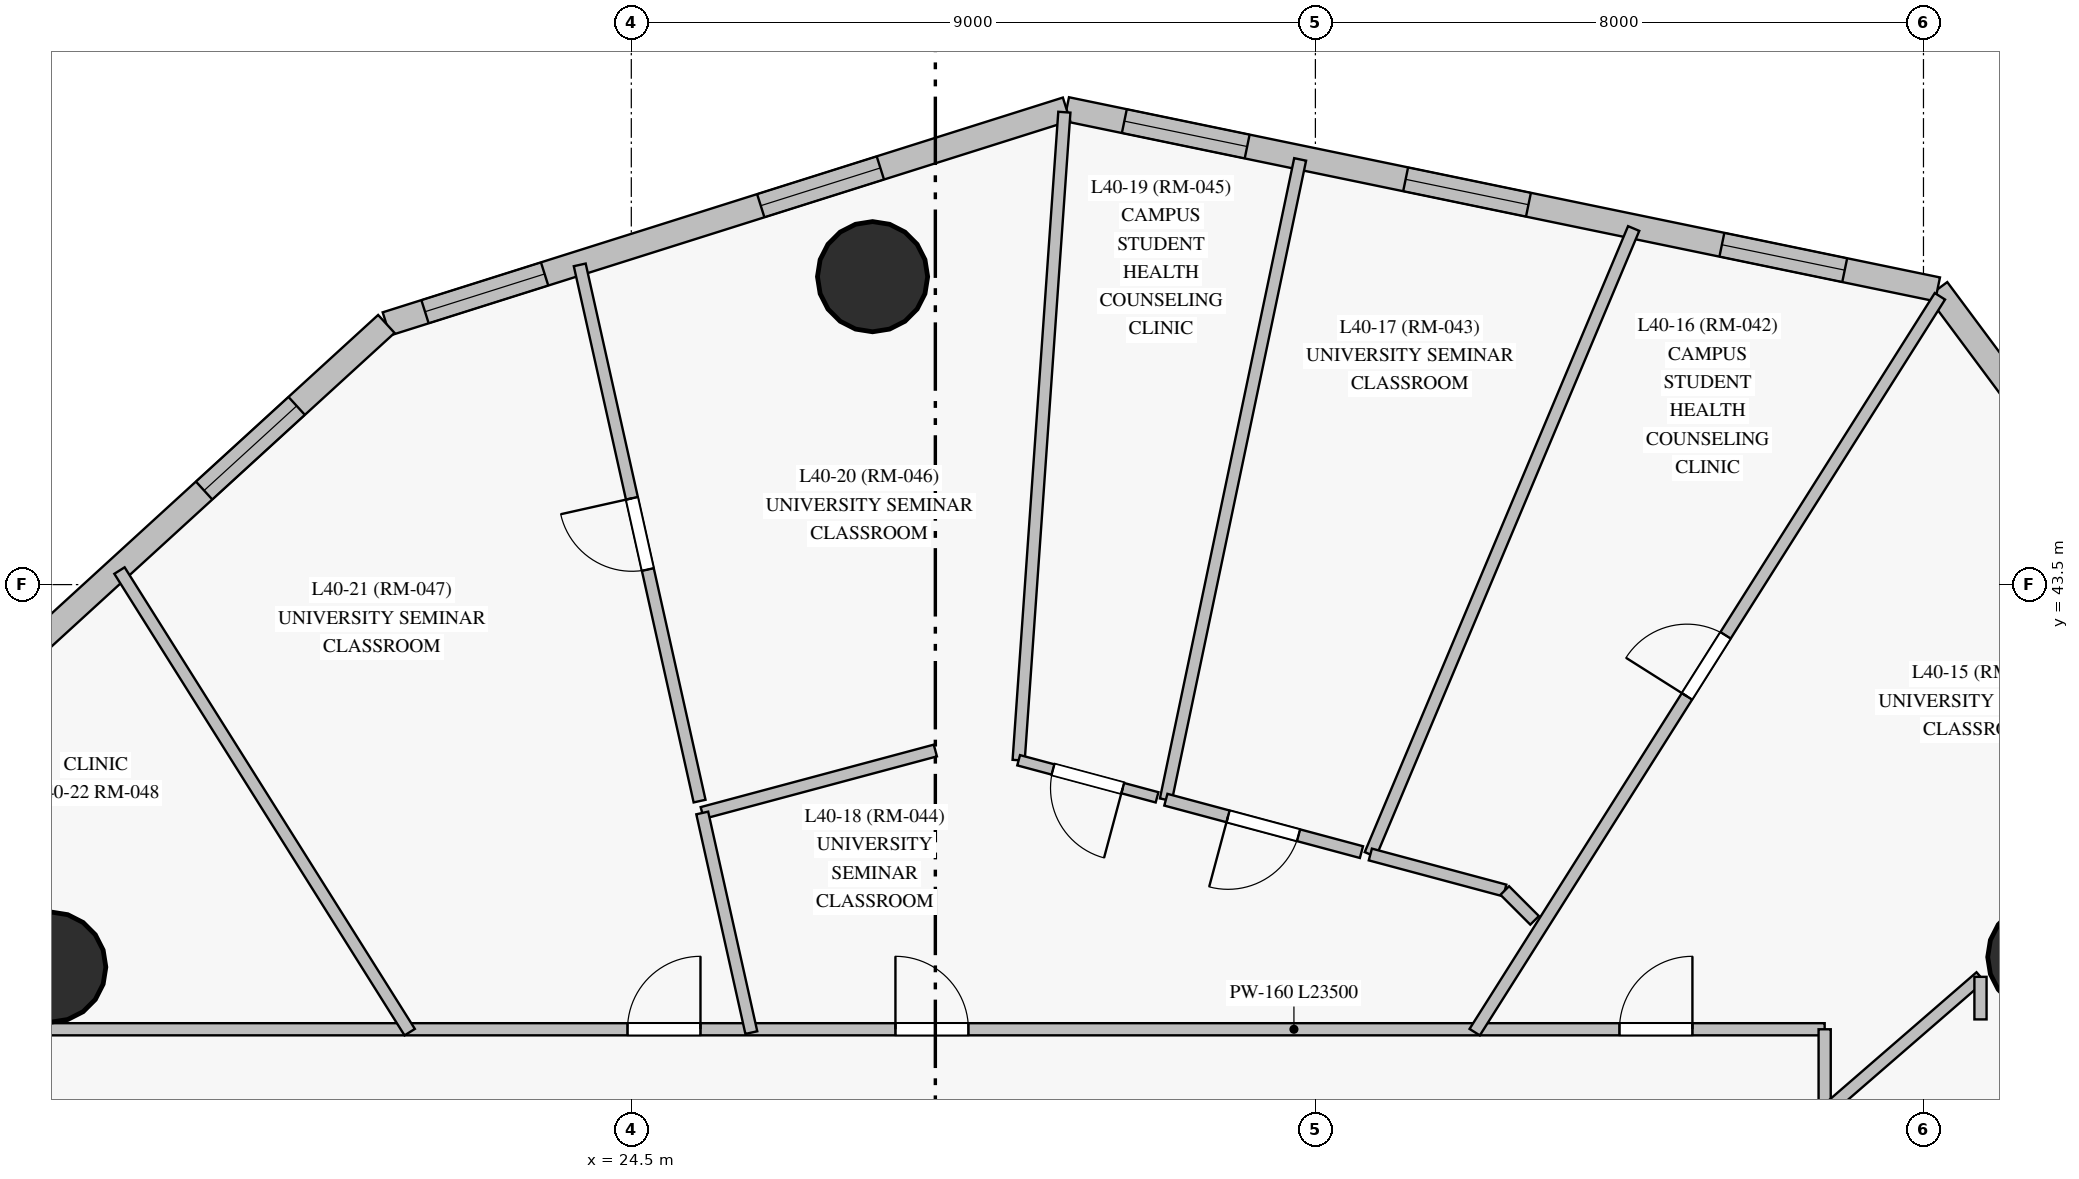
"""IFC4 building model, lengths in metres.
Left out: names, types, materials, properties, quantities, classifications, styles, units other than length and angle.
Written with IfcOpenShell. Run it as: python <this file> out.ifc"""

import sys

from ifc_helpers import new_model, si_unit, direction, frame, frame_2d, origin, origin_with_axes, origin_2d, place, context, subcontext, project, spatial, rectangle, circle, extrude, source, transform, mapped, element, fill, save


model = new_model("IFC4")
c1 = context("Model", 3, precision=1e-05, world=origin(), true_north=direction((0.0, 1.0)))
c2 = subcontext(c1, "Body", "Model", "MODEL_VIEW")
j1 = project(units=[si_unit("LENGTHUNIT", "METRE"), si_unit("PLANEANGLEUNIT", "RADIAN")], contexts=[c1])
p1 = place(None, origin())
s1 = spatial("IfcSite", under=j1, at=p1, CompositionType="ELEMENT")
p2 = place(p1, origin())
s2 = spatial("IfcBuilding", under=s1, at=p2, CompositionType="ELEMENT")
p3 = place(p2, frame((0.0, 0.0, 141.95)))
s3 = spatial("IfcBuildingStorey", under=s2, at=p3, CompositionType="ELEMENT", Elevation=141.95)
m1 = source(origin_with_axes(), c2, "Body", "SweptSolid", [
    extrude(circle(Radius=0.725, at=origin_2d()), origin(), (0.0, 0.0, 1.0), 3.05),
])
for number, where, z_axis, x_axis in (
    (1, (43.07, 38.6, 0.0), (0.0, 0.0, 1.0), (1.0, 0.0, 0.0)),
    (2, (27.674, 47.551, 0.0), (0.0, 0.0, 1.0), (1.0, 0.0, 0.0)),
    (3, (16.862, 38.468, 0.0), (0.0, 0.0, 1.0), (1.0, 0.0, 0.0)),
):
    element("IfcColumn", number, at=place(p3, frame(where, z_axis=z_axis, x_axis=x_axis)), inside=s3, PredefinedType="COLUMN", context=c2, shape_type="MappedRepresentation", body=[
        mapped(m1, transform((0.0, 0.0, 0.0), scale=1.0)),
    ])
p4 = place(p3, frame((47.272, 39.87, 0.0), z_axis=(0.0, 0.0, 1.0), x_axis=(-0.596716111469, 0.802452417476, 0.0)))
e4 = element("IfcWall", 4, at=p4, inside=s3, PredefinedType="SOLIDWALL", context=c2, shape_type="SweptSolid", body=[
    extrude(rectangle(XDim=9.364, YDim=0.32, at=frame_2d((4.682, 0.0))), origin(), (0.0, 0.0, 1.0), 2.825),
])
p5 = place(p4, frame((0.622, 0.0, 0.85)))
e5 = element("IfcOpeningElement", 5, at=p5, cuts=e4, PredefinedType="OPENING", context=c2, shape_type="SweptSolid", body=[
    extrude(rectangle(XDim=0.95, YDim=1.5, at=frame_2d((0.475, 0.75))), frame((0.0, 0.17, 0.0), z_axis=(0.0, -1.0, 0.0), x_axis=(1.0, 0.0, 0.0)), (0.0, 0.0, 1.0), 0.34),
])
p6 = place(p4, frame((4.872, 0.0, 0.85)))
e6 = element("IfcOpeningElement", 6, at=p6, cuts=e4, PredefinedType="OPENING", context=c2, shape_type="SweptSolid", body=[
    extrude(rectangle(XDim=1.65, YDim=1.65, at=frame_2d((0.825, 0.825))), frame((0.0, 0.17, 0.0), z_axis=(0.0, -1.0, 0.0), x_axis=(1.0, 0.0, 0.0)), (0.0, 0.0, 1.0), 0.34),
])
p7 = place(p3, frame((41.685, 47.385, 0.0), z_axis=(0.0, 0.0, 1.0), x_axis=(-0.979267413352, 0.202571797512, 0.0)))
e7 = element("IfcWall", 7, at=p7, inside=s3, PredefinedType="SOLIDWALL", context=c2, shape_type="SweptSolid", body=[
    extrude(rectangle(XDim=11.701, YDim=0.32, at=frame_2d((5.851, 0.0))), origin(), (0.0, 0.0, 1.0), 2.825),
])
p8 = place(p7, frame((1.247, 0.0, 0.85)))
e8 = element("IfcOpeningElement", 8, at=p8, cuts=e7, PredefinedType="OPENING", context=c2, shape_type="SweptSolid", body=[
    extrude(rectangle(XDim=1.65, YDim=1.65, at=frame_2d((0.825, 0.825))), frame((0.0, 0.17, 0.0), z_axis=(0.0, -1.0, 0.0), x_axis=(1.0, 0.0, 0.0)), (0.0, 0.0, 1.0), 0.34),
])
p9 = place(p7, frame((5.496, 0.0, 0.85)))
e9 = element("IfcOpeningElement", 9, at=p9, cuts=e7, PredefinedType="OPENING", context=c2, shape_type="SweptSolid", body=[
    extrude(rectangle(XDim=1.65, YDim=1.65, at=frame_2d((0.825, 0.825))), frame((0.0, 0.17, 0.0), z_axis=(0.0, -1.0, 0.0), x_axis=(1.0, 0.0, 0.0)), (0.0, 0.0, 1.0), 0.34),
])
p10 = place(p7, frame((9.275, 0.0, 0.85)))
e10 = element("IfcOpeningElement", 10, at=p10, cuts=e7, PredefinedType="OPENING", context=c2, shape_type="SweptSolid", body=[
    extrude(rectangle(XDim=1.65, YDim=1.65, at=frame_2d((0.825, 0.825))), frame((0.0, 0.17, 0.0), z_axis=(0.0, -1.0, 0.0), x_axis=(1.0, 0.0, 0.0)), (0.0, 0.0, 1.0), 0.34),
])
p11 = place(p3, frame((30.226, 49.755, 0.0), z_axis=(0.0, 0.0, 1.0), x_axis=(-0.953594853598, -0.301092768414, 0.0)))
e11 = element("IfcWall", 11, at=p11, inside=s3, PredefinedType="SOLIDWALL", context=c2, shape_type="SweptSolid", body=[
    extrude(rectangle(XDim=9.384, YDim=0.32, at=frame_2d((4.692, 0.0))), origin(), (0.0, 0.0, 1.0), 2.825),
])
p12 = place(p11, frame((2.569, 0.0, 0.85)))
e12 = element("IfcOpeningElement", 12, at=p12, cuts=e11, PredefinedType="OPENING", context=c2, shape_type="SweptSolid", body=[
    extrude(rectangle(XDim=1.65, YDim=1.65, at=frame_2d((0.825, 0.825))), frame((0.0, 0.17, 0.0), z_axis=(0.0, -1.0, 0.0), x_axis=(1.0, 0.0, 0.0)), (0.0, 0.0, 1.0), 0.34),
])
p13 = place(p11, frame((7.2, 0.0, 0.85)))
e13 = element("IfcOpeningElement", 13, at=p13, cuts=e11, PredefinedType="OPENING", context=c2, shape_type="SweptSolid", body=[
    extrude(rectangle(XDim=1.65, YDim=1.65, at=frame_2d((0.825, 0.825))), frame((0.0, 0.17, 0.0), z_axis=(0.0, -1.0, 0.0), x_axis=(1.0, 0.0, 0.0)), (0.0, 0.0, 1.0), 0.34),
])
p14 = place(p3, frame((21.277, 46.929, 0.0), z_axis=(0.0, 0.0, 1.0), x_axis=(-0.7380815776, -0.674711482641, 0.0)))
e14 = element("IfcWall", 14, at=p14, inside=s3, PredefinedType="SOLIDWALL", context=c2, shape_type="SweptSolid", body=[
    extrude(rectangle(XDim=13.561, YDim=0.32, at=frame_2d((6.781, 0.0))), origin(), (0.0, 0.0, 1.0), 2.825),
])
p15 = place(p14, frame((1.598, 0.0, 0.85)))
e15 = element("IfcOpeningElement", 15, at=p15, cuts=e14, PredefinedType="OPENING", context=c2, shape_type="SweptSolid", body=[
    extrude(rectangle(XDim=1.65, YDim=1.65, at=frame_2d((0.825, 0.825))), frame((0.0, 0.17, 0.0), z_axis=(0.0, -1.0, 0.0), x_axis=(1.0, 0.0, 0.0)), (0.0, 0.0, 1.0), 0.34),
])
p16 = place(p14, frame((6.3, 0.0, 0.85)))
e16 = element("IfcOpeningElement", 16, at=p16, cuts=e14, PredefinedType="OPENING", context=c2, shape_type="SweptSolid", body=[
    extrude(rectangle(XDim=1.65, YDim=1.65, at=frame_2d((0.825, 0.825))), frame((0.0, 0.17, 0.0), z_axis=(0.0, -1.0, 0.0), x_axis=(1.0, 0.0, 0.0)), (0.0, 0.0, 1.0), 0.34),
])
p17 = place(p14, frame((10.337, 0.0, 0.85)))
e17 = element("IfcOpeningElement", 17, at=p17, cuts=e14, PredefinedType="OPENING", context=c2, shape_type="SweptSolid", body=[
    extrude(rectangle(XDim=1.65, YDim=1.65, at=frame_2d((0.825, 0.825))), frame((0.0, 0.17, 0.0), z_axis=(0.0, -1.0, 0.0), x_axis=(1.0, 0.0, 0.0)), (0.0, 0.0, 1.0), 0.34),
])
p18 = place(p3, frame((16.7, 37.65, 0.0), z_axis=(0.0, 0.0, 1.0), x_axis=(1.0, 0.0, 0.0)))
e18 = element("IfcWall", 18, at=p18, inside=s3, PredefinedType="PARTITIONING", context=c2, shape_type="SweptSolid", body=[
    extrude(rectangle(XDim=23.5, YDim=0.16, at=frame_2d((11.75, 0.0))), origin(), (0.0, 0.0, 1.0), 2.325),
])
p19 = place(p18, frame((20.8, 0.0, 0.0)))
e19 = element("IfcOpeningElement", 19, at=p19, cuts=e18, PredefinedType="OPENING", context=c2, shape_type="SweptSolid", body=[
    extrude(rectangle(XDim=0.96, YDim=2.15, at=frame_2d((0.48, 1.075))), frame((0.0, 0.09, 0.0), z_axis=(0.0, -1.0, 0.0), x_axis=(1.0, 0.0, 0.0)), (0.0, 0.0, 1.0), 0.18),
])
p20 = place(p18, frame((11.275, 0.0, 0.0)))
e20 = element("IfcOpeningElement", 20, at=p20, cuts=e18, PredefinedType="OPENING", context=c2, shape_type="SweptSolid", body=[
    extrude(rectangle(XDim=0.96, YDim=2.15, at=frame_2d((0.48, 1.075))), frame((0.0, 0.09, 0.0), z_axis=(0.0, -1.0, 0.0), x_axis=(1.0, 0.0, 0.0)), (0.0, 0.0, 1.0), 0.18),
])
p21 = place(p18, frame((7.75, 0.0, 0.0)))
e21 = element("IfcOpeningElement", 21, at=p21, cuts=e18, PredefinedType="OPENING", context=c2, shape_type="SweptSolid", body=[
    extrude(rectangle(XDim=0.96, YDim=2.15, at=frame_2d((0.48, 1.075))), frame((0.0, 0.09, 0.0), z_axis=(0.0, -1.0, 0.0), x_axis=(1.0, 0.0, 0.0)), (0.0, 0.0, 1.0), 0.18),
])
p22 = place(p3, frame((40.2, 37.65, 0.0), z_axis=(0.0, 0.0, 1.0), x_axis=(0.0, -1.0, 0.0)))
e22 = element("IfcWall", 22, at=p22, inside=s3, PredefinedType="PARTITIONING", context=c2, shape_type="SweptSolid", body=[
    extrude(rectangle(XDim=22.3, YDim=0.16, at=frame_2d((11.15, 0.0))), origin(), (0.0, 0.0, 1.0), 2.325),
])
p23 = place(p22, frame((14.02, 0.0, 0.0)))
e23 = element("IfcOpeningElement", 23, at=p23, cuts=e22, PredefinedType="OPENING", context=c2, shape_type="SweptSolid", body=[
    extrude(rectangle(XDim=0.96, YDim=2.15, at=frame_2d((0.48, 1.075))), frame((0.0, 0.09, 0.0), z_axis=(0.0, -1.0, 0.0), x_axis=(1.0, 0.0, 0.0)), (0.0, 0.0, 1.0), 0.18),
])
p24 = place(p22, frame((10.675, 0.0, 0.0)))
e24 = element("IfcOpeningElement", 24, at=p24, cuts=e22, PredefinedType="OPENING", context=c2, shape_type="SweptSolid", body=[
    extrude(rectangle(XDim=0.95, YDim=2.15, at=frame_2d((0.475, 1.075))), frame((0.0, 0.09, 0.0), z_axis=(0.0, -1.0, 0.0), x_axis=(1.0, 0.0, 0.0)), (0.0, 0.0, 1.0), 0.18),
])
p25 = place(p22, frame((5.1, 0.0, 0.0)))
e25 = element("IfcOpeningElement", 25, at=p25, cuts=e22, PredefinedType="OPENING", context=c2, shape_type="SweptSolid", body=[
    extrude(rectangle(XDim=0.96, YDim=2.15, at=frame_2d((0.48, 1.075))), frame((0.0, 0.09, 0.0), z_axis=(0.0, -1.0, 0.0), x_axis=(1.0, 0.0, 0.0)), (0.0, 0.0, 1.0), 0.18),
])
p26 = place(p3, frame((35.596, 37.612, 0.0), z_axis=(0.0, 0.0, 1.0), x_axis=(0.53436425584, 0.845254306159, 0.0)))
e26 = element("IfcWall", 26, at=p26, inside=s3, PredefinedType="PARTITIONING", context=c2, shape_type="SweptSolid", body=[
    extrude(rectangle(XDim=11.454, YDim=0.16, at=frame_2d((5.727, 0.0))), origin(), (0.0, 0.0, 1.0), 2.825),
])
p27 = place(p26, frame((5.227, 0.0, 0.0)))
e27 = element("IfcOpeningElement", 27, at=p27, cuts=e26, PredefinedType="OPENING", context=c2, shape_type="SweptSolid", body=[
    extrude(rectangle(XDim=0.95, YDim=2.15, at=frame_2d((0.475, 1.075))), frame((0.0, 0.09, 0.0), z_axis=(0.0, -1.0, 0.0), x_axis=(1.0, 0.0, 0.0)), (0.0, 0.0, 1.0), 0.18),
])
p28 = place(p3, frame((34.223, 39.949, 0.0), z_axis=(0.0, 0.0, 1.0), x_axis=(0.387756457324, 0.921761861765, 0.0)))
e28 = element("IfcWall", 28, at=p28, inside=s3, PredefinedType="PARTITIONING", context=c2, shape_type="SweptSolid", body=[
    extrude(rectangle(XDim=8.934, YDim=0.16, at=frame_2d((4.467, 0.0))), origin(), (0.0, 0.0, 1.0), 2.825),
])
p29 = place(p3, frame((31.533, 40.67, 0.0), z_axis=(0.0, 0.0, 1.0), x_axis=(0.205255601094, 0.97870840306, 0.0)))
e29 = element("IfcWall", 29, at=p29, inside=s3, PredefinedType="PARTITIONING", context=c2, shape_type="SweptSolid", body=[
    extrude(rectangle(XDim=8.607, YDim=0.16, at=frame_2d((4.303, 0.0))), origin(), (0.0, 0.0, 1.0), 2.825),
])
p30 = place(p3, frame((29.596, 41.189, 0.0), z_axis=(0.0, 0.0, 1.0), x_axis=(0.070353843658, 0.997522098343, 0.0)))
e30 = element("IfcWall", 30, at=p30, inside=s3, PredefinedType="PARTITIONING", context=c2, shape_type="SweptSolid", body=[
    extrude(rectangle(XDim=8.547, YDim=0.16, at=frame_2d((4.273, 0.0))), origin(), (0.0, 0.0, 1.0), 2.825),
])
p31 = place(p3, frame((25.398, 40.652, 0.0), z_axis=(0.0, 0.0, 1.0), x_axis=(-0.218149748092, 0.975915307497, 0.0)))
e31 = element("IfcWall", 31, at=p31, inside=s3, PredefinedType="PARTITIONING", context=c2, shape_type="SweptSolid", body=[
    extrude(rectangle(XDim=7.229, YDim=0.16, at=frame_2d((3.614, 0.0))), origin(), (0.0, 0.0, 1.0), 2.825),
])
p32 = place(p31, frame((3.122, 0.0, 0.0)))
e32 = element("IfcOpeningElement", 32, at=p32, cuts=e31, PredefinedType="OPENING", context=c2, shape_type="SweptSolid", body=[
    extrude(rectangle(XDim=0.96, YDim=2.15, at=frame_2d((0.48, 1.075))), frame((0.0, 0.09, 0.0), z_axis=(0.0, -1.0, 0.0), x_axis=(1.0, 0.0, 0.0)), (0.0, 0.0, 1.0), 0.18),
])
p33 = place(p3, frame((21.585, 37.612, 0.0), z_axis=(0.0, 0.0, 1.0), x_axis=(-0.532276089575, 0.84657082661, 0.0)))
e33 = element("IfcWall", 33, at=p33, inside=s3, PredefinedType="PARTITIONING", context=c2, shape_type="SweptSolid", body=[
    extrude(rectangle(XDim=7.174, YDim=0.16, at=frame_2d((3.587, 0.0))), origin(), (0.0, 0.0, 1.0), 2.825),
])
p34 = place(p3, frame((25.433, 40.495, 0.0), z_axis=(0.0, 0.0, 1.0), x_axis=(0.965920247207, 0.258839865624, 0.0)))
e34 = element("IfcWall", 34, at=p34, inside=s3, PredefinedType="PARTITIONING", context=c2, shape_type="SweptSolid", body=[
    extrude(rectangle(XDim=3.175, YDim=0.16, at=frame_2d((1.587, 0.0))), origin(), (0.0, 0.0, 1.0), 2.325),
])
p35 = place(p3, frame((26.079, 37.606, 0.0), z_axis=(0.0, 0.0, 1.0), x_axis=(-0.218126558905, 0.975920490768, 0.0)))
e35 = element("IfcWall", 35, at=p35, inside=s3, PredefinedType="PARTITIONING", context=c2, shape_type="SweptSolid", body=[
    extrude(rectangle(XDim=2.96, YDim=0.16, at=frame_2d((1.48, 0.0))), origin(), (0.0, 0.0, 1.0), 2.825),
])
p36 = place(p3, frame((40.166, 36.533, 0.0), z_axis=(0.0, 0.0, 1.0), x_axis=(0.755595613728, 0.655038371788, 0.0)))
e36 = element("IfcWall", 36, at=p36, inside=s3, PredefinedType="PARTITIONING", context=c2, shape_type="SweptSolid", body=[
    extrude(rectangle(XDim=2.758, YDim=0.16, at=frame_2d((1.379, 0.0))), origin(), (0.0, 0.0, 1.0), 2.225),
])
p37 = place(p3, frame((34.106, 39.981, 0.0), z_axis=(0.0, 0.0, 1.0), x_axis=(-0.965923913915, 0.258826182076, 0.0)))
e37 = element("IfcWall", 37, at=p37, inside=s3, PredefinedType="PARTITIONING", context=c2, shape_type="SweptSolid", body=[
    extrude(rectangle(XDim=2.664, YDim=0.16, at=frame_2d((1.332, 0.0))), origin(), (0.0, 0.0, 1.0), 2.325),
])
p38 = place(p37, frame((0.857, 0.0, 0.0)))
e38 = element("IfcOpeningElement", 38, at=p38, cuts=e37, PredefinedType="OPENING", context=c2, shape_type="SweptSolid", body=[
    extrude(rectangle(XDim=0.96, YDim=2.15, at=frame_2d((0.48, 1.075))), frame((0.0, 0.09, 0.0), z_axis=(0.0, -1.0, 0.0), x_axis=(1.0, 0.0, 0.0)), (0.0, 0.0, 1.0), 0.18),
])
p39 = place(p3, frame((31.417, 40.701, 0.0), z_axis=(0.0, 0.0, 1.0), x_axis=(-0.965937646204, 0.258774928549, 0.0)))
e39 = element("IfcWall", 39, at=p39, inside=s3, PredefinedType="PARTITIONING", context=c2, shape_type="SweptSolid", body=[
    extrude(rectangle(XDim=1.885, YDim=0.14, at=frame_2d((0.942, 0.0))), origin(), (0.0, 0.0, 1.0), 2.325),
])
p40 = place(p39, frame((0.468, 0.0, 0.0)))
e40 = element("IfcOpeningElement", 40, at=p40, cuts=e39, PredefinedType="OPENING", context=c2, shape_type="SweptSolid", body=[
    extrude(rectangle(XDim=0.95, YDim=2.15, at=frame_2d((0.475, 1.075))), frame((0.0, 0.08, 0.0), z_axis=(0.0, -1.0, 0.0), x_axis=(1.0, 0.0, 0.0)), (0.0, 0.0, 1.0), 0.16),
])
p41 = place(p3, frame((35.991, 39.476, 0.0), z_axis=(0.0, 0.0, 1.0), x_axis=(-0.965926624666, 0.258816065499, 0.0)))
e41 = element("IfcWall", 41, at=p41, inside=s3, PredefinedType="PARTITIONING", context=c2, shape_type="SweptSolid", body=[
    extrude(rectangle(XDim=1.831, YDim=0.16, at=frame_2d((0.916, 0.0))), origin(), (0.0, 0.0, 1.0), 2.325),
])
p42 = place(p3, frame((42.25, 38.34, 0.0), z_axis=(0.0, 0.0, 1.0), x_axis=(0.0, -1.0, 0.0)))
e42 = element("IfcWall", 42, at=p42, inside=s3, PredefinedType="PARTITIONING", context=c2, shape_type="SweptSolid", body=[
    extrude(rectangle(XDim=0.56, YDim=0.16, at=frame_2d((0.28, 0.0))), origin(), (0.0, 0.0, 1.0), 2.325),
])
p43 = place(p3, frame((36.384, 39.083, 0.0), z_axis=(0.0, 0.0, 1.0), x_axis=(-0.706886807091, 0.707326686871, 0.0)))
e43 = element("IfcWall", 43, at=p43, inside=s3, PredefinedType="PARTITIONING", context=c2, shape_type="SweptSolid", body=[
    extrude(rectangle(XDim=0.555, YDim=0.16, at=frame_2d((0.277, 0.0))), origin(), (0.0, 0.0, 1.0), 2.325),
])
m2 = source(origin_with_axes(), c2, "Body", "SweptSolid", [
    extrude(rectangle(XDim=1.65, YDim=1.65, at=frame_2d((0.825, 0.825))), frame((0.0, 0.03, 0.0), z_axis=(0.0, -1.0, 0.0), x_axis=(1.0, 0.0, 0.0)), (0.0, 0.0, 1.0), 0.06),
])
p44 = place(p8, origin())
e44 = element("IfcWindow", 44, at=p44, inside=s3, PartitioningType="SINGLE_PANEL", PredefinedType="WINDOW", context=c2, shape_type="MappedRepresentation", body=[
    mapped(m2, transform((0.0, 0.0, 0.0), scale=1.0)),
])
fill(e8, e44)
p45 = place(p9, origin())
e45 = element("IfcWindow", 45, at=p45, inside=s3, PartitioningType="SINGLE_PANEL", PredefinedType="WINDOW", context=c2, shape_type="MappedRepresentation", body=[
    mapped(m2, transform((0.0, 0.0, 0.0), scale=1.0)),
])
fill(e9, e45)
p46 = place(p10, origin())
e46 = element("IfcWindow", 46, at=p46, inside=s3, PartitioningType="SINGLE_PANEL", PredefinedType="WINDOW", context=c2, shape_type="MappedRepresentation", body=[
    mapped(m2, transform((0.0, 0.0, 0.0), scale=1.0)),
])
fill(e10, e46)
p47 = place(p12, origin())
e47 = element("IfcWindow", 47, at=p47, inside=s3, PartitioningType="SINGLE_PANEL", PredefinedType="WINDOW", context=c2, shape_type="MappedRepresentation", body=[
    mapped(m2, transform((0.0, 0.0, 0.0), scale=1.0)),
])
fill(e12, e47)
p48 = place(p13, origin())
e48 = element("IfcWindow", 48, at=p48, inside=s3, PartitioningType="SINGLE_PANEL", PredefinedType="WINDOW", context=c2, shape_type="MappedRepresentation", body=[
    mapped(m2, transform((0.0, 0.0, 0.0), scale=1.0)),
])
fill(e13, e48)
p49 = place(p15, origin())
e49 = element("IfcWindow", 49, at=p49, inside=s3, PartitioningType="SINGLE_PANEL", PredefinedType="WINDOW", context=c2, shape_type="MappedRepresentation", body=[
    mapped(m2, transform((0.0, 0.0, 0.0), scale=1.0)),
])
fill(e15, e49)
m3 = source(origin_with_axes(), c2, "Body", "SweptSolid", [
    extrude(rectangle(XDim=0.96, YDim=2.15, at=frame_2d((0.48, 1.075))), frame((0.0, 0.025, 0.0), z_axis=(0.0, -1.0, 0.0), x_axis=(1.0, 0.0, 0.0)), (0.0, 0.0, 1.0), 0.05),
])
p50 = place(p19, origin())
e50 = element("IfcDoor", 50, at=p50, inside=s3, OperationType="SINGLE_SWING_RIGHT", PredefinedType="DOOR", context=c2, shape_type="MappedRepresentation", body=[
    mapped(m3, transform((0.0, 0.0, 0.0), scale=1.0)),
])
fill(e19, e50)
p51 = place(p20, origin())
e51 = element("IfcDoor", 51, at=p51, inside=s3, OperationType="SINGLE_SWING_LEFT", PredefinedType="DOOR", context=c2, shape_type="MappedRepresentation", body=[
    mapped(m3, transform((0.0, 0.0, 0.0), scale=1.0)),
])
fill(e20, e51)
p52 = place(p21, origin())
e52 = element("IfcDoor", 52, at=p52, inside=s3, OperationType="SINGLE_SWING_RIGHT", PredefinedType="DOOR", context=c2, shape_type="MappedRepresentation", body=[
    mapped(m3, transform((0.0, 0.0, 0.0), scale=1.0)),
])
fill(e21, e52)
m4 = source(origin_with_axes(), c2, "Body", "SweptSolid", [
    extrude(rectangle(XDim=0.95, YDim=2.15, at=frame_2d((0.475, 1.075))), frame((0.0, 0.025, 0.0), z_axis=(0.0, -1.0, 0.0), x_axis=(1.0, 0.0, 0.0)), (0.0, 0.0, 1.0), 0.05),
])
p53 = place(p27, origin())
e53 = element("IfcDoor", 53, at=p53, inside=s3, OperationType="SINGLE_SWING_LEFT", PredefinedType="DOOR", context=c2, shape_type="MappedRepresentation", body=[
    mapped(m4, transform((0.0, 0.0, 0.0), scale=1.0)),
])
fill(e27, e53)
p54 = place(p38, origin())
e54 = element("IfcDoor", 54, at=p54, inside=s3, OperationType="SINGLE_SWING_RIGHT", PredefinedType="DOOR", context=c2, shape_type="MappedRepresentation", body=[
    mapped(m3, transform((0.0, 0.0, 0.0), scale=1.0)),
])
fill(e38, e54)
p55 = place(p40, origin())
e55 = element("IfcDoor", 55, at=p55, inside=s3, OperationType="SINGLE_SWING_LEFT", PredefinedType="DOOR", context=c2, shape_type="MappedRepresentation", body=[
    mapped(m4, transform((0.0, 0.0, 0.0), scale=1.0)),
])
fill(e40, e55)
p56 = place(p32, origin())
e56 = element("IfcDoor", 56, at=p56, inside=s3, OperationType="SINGLE_SWING_RIGHT", PredefinedType="DOOR", context=c2, shape_type="MappedRepresentation", body=[
    mapped(m3, transform((0.0, 0.0, 0.0), scale=1.0)),
])
fill(e32, e56)
save(model, sys.argv[1])
